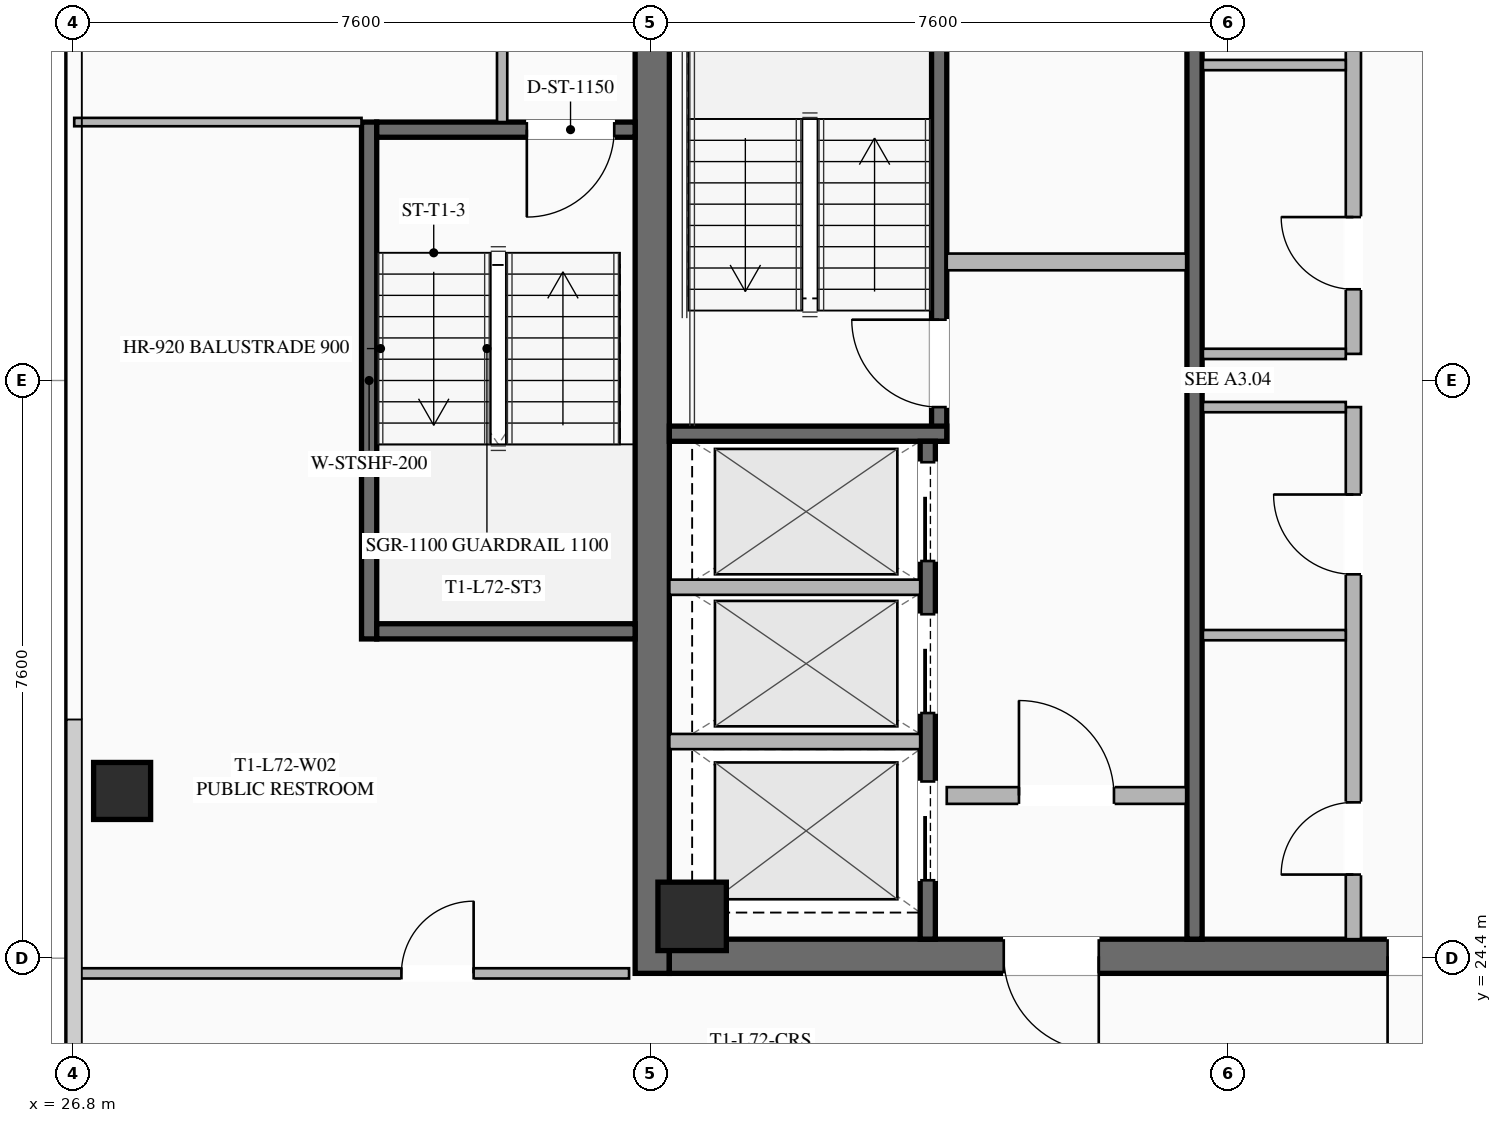
"""IFC4 building model, lengths in metres.
Left out: names, types, materials, properties, quantities, classifications, styles, units other than length and angle.
Written with IfcOpenShell. Run it as: python <this file> out.ifc"""

import sys

from ifc_helpers import new_model, si_unit, direction, frame, frame_2d, origin, origin_2d, place, context, subcontext, project, spatial, rectangle, hollow_rectangle, extrude, element, fill, save


model = new_model("IFC4")
c1 = context("Model", 3, precision=1e-05, world=origin(), true_north=direction((0.0, 1.0)))
c2 = subcontext(c1, "Body", "Model", "MODEL_VIEW")
j1 = project(units=[si_unit("LENGTHUNIT", "METRE"), si_unit("PLANEANGLEUNIT", "RADIAN")], contexts=[c1])
p1 = place(None, origin())
s1 = spatial("IfcSite", under=j1, at=p1, CompositionType="ELEMENT")
p2 = place(p1, origin())
s2 = spatial("IfcBuilding", under=s1, at=p2, CompositionType="ELEMENT")
p3 = place(p2, frame((0.0, 0.0, 266.95)))
s3 = spatial("IfcBuildingStorey", under=s2, at=p3, CompositionType="ELEMENT", Elevation=266.95)
p4 = place(p3, frame((34.425, 24.2, 0.0), z_axis=(0.0, 0.0, 1.0), x_axis=(0.0, 1.0, 0.0)))
e1 = element("IfcWall", 1, at=p4, inside=s3, PredefinedType="SHEAR", context=c2, shape_type="SweptSolid", body=[
    extrude(rectangle(XDim=15.6, YDim=0.45, at=frame_2d((7.8, 0.0))), origin(), (0.0, 0.0, 1.0), 3.55),
])
p5 = place(p3, frame((49.35, 24.425, 0.0), z_axis=(0.0, 0.0, 1.0), x_axis=(-1.0, 0.0, 0.0)))
e2 = element("IfcWall", 2, at=p5, inside=s3, PredefinedType="SHEAR", context=c2, shape_type="SweptSolid", body=[
    extrude(rectangle(XDim=14.7, YDim=0.45, at=frame_2d((7.35, 0.0))), origin(), (0.0, 0.0, 1.0), 3.55),
])
p6 = place(p5, frame((9.05, 0.0, 0.0)))
e3 = element("IfcOpeningElement", 3, at=p6, cuts=e2, PredefinedType="OPENING", context=c2, shape_type="SweptSolid", body=[
    extrude(rectangle(XDim=1.25, YDim=2.25, at=frame_2d((0.625, 1.125))), frame((0.0, 0.235, 0.0), z_axis=(0.0, -1.0, 0.0), x_axis=(1.0, 0.0, 0.0)), (0.0, 0.0, 1.0), 0.47),
])
p7 = place(p5, frame((4.0, 0.0, 0.0)))
e4 = element("IfcOpeningElement", 4, at=p7, cuts=e2, PredefinedType="OPENING", context=c2, shape_type="SweptSolid", body=[
    extrude(rectangle(XDim=1.25, YDim=2.25, at=frame_2d((0.625, 1.125))), frame((0.0, 0.235, 0.0), z_axis=(0.0, -1.0, 0.0), x_axis=(1.0, 0.0, 0.0)), (0.0, 0.0, 1.0), 0.47),
])
p8 = place(p3, frame((34.95, 24.95, 0.0), z_axis=(0.0, 0.0, 1.0), x_axis=(1.0, 0.0, 0.0)))
e5 = element("IfcColumn", 5, at=p8, inside=s3, PredefinedType="COLUMN", context=c2, shape_type="SweptSolid", body=[
    extrude(hollow_rectangle(XDim=0.9, YDim=0.9, WallThickness=0.04, at=origin_2d()), origin(), (0.0, 0.0, 1.0), 3.37),
])
p9 = place(p3, frame((27.45, 26.6, 0.0), z_axis=(0.0, 0.0, 1.0), x_axis=(1.0, 0.0, 0.0)))
e6 = element("IfcColumn", 6, at=p9, inside=s3, PredefinedType="COLUMN", context=c2, shape_type="SweptSolid", body=[
    extrude(hollow_rectangle(XDim=0.75, YDim=0.75, WallThickness=0.032, at=origin_2d()), origin(), (0.0, 0.0, 1.0), 3.37),
])
p10 = place(p3, frame((38.2, 31.2, 0.0), z_axis=(0.0, 0.0, 1.0), x_axis=(0.0, 1.0, 0.0)))
e7 = element("IfcWall", 7, at=p10, inside=s3, PredefinedType="SHEAR", context=c2, shape_type="SweptSolid", body=[
    extrude(rectangle(XDim=8.15, YDim=0.2, at=frame_2d((4.075, 0.0))), origin(), (0.0, 0.0, 1.0), 3.37),
])
p11 = place(p10, frame((0.45, 0.0, 0.0)))
e8 = element("IfcOpeningElement", 8, at=p11, cuts=e7, PredefinedType="OPENING", context=c2, shape_type="SweptSolid", body=[
    extrude(rectangle(XDim=1.15, YDim=2.2, at=frame_2d((0.575, 1.1))), frame((0.0, 0.11, 0.0), z_axis=(0.0, -1.0, 0.0), x_axis=(1.0, 0.0, 0.0)), (0.0, 0.0, 1.0), 0.22),
])
p12 = place(p3, frame((34.65, 31.3, 0.0), z_axis=(0.0, 0.0, 1.0), x_axis=(1.0, 0.0, 0.0)))
e9 = element("IfcWall", 9, at=p12, inside=s3, PredefinedType="SHEAR", context=c2, shape_type="SweptSolid", body=[
    extrude(rectangle(XDim=3.65, YDim=0.2, at=frame_2d((1.825, 0.0))), origin(), (0.0, 0.0, 1.0), 3.37),
])
p13 = place(p3, frame((41.56, 24.65, 0.0), z_axis=(0.0, 0.0, 1.0), x_axis=(0.0, 1.0, 0.0)))
e10 = element("IfcWall", 10, at=p13, inside=s3, PredefinedType="SHEAR", context=c2, shape_type="SweptSolid", body=[
    extrude(rectangle(XDim=14.7, YDim=0.2, at=frame_2d((7.35, 0.0))), origin(), (0.0, 0.0, 1.0), 3.37),
])
p14 = place(p3, frame((38.3, 33.56, 0.0), z_axis=(0.0, 0.0, 1.0), x_axis=(1.0, 0.0, 0.0)))
e11 = element("IfcWall", 11, at=p14, inside=s3, PredefinedType="SOLIDWALL", context=c2, shape_type="SweptSolid", body=[
    extrude(rectangle(XDim=3.15, YDim=0.22, at=frame_2d((1.575, 0.0))), origin(), (0.0, 0.0, 1.0), 2.723),
])
p15 = place(p3, frame((38.3, 26.54, 0.0), z_axis=(0.0, 0.0, 1.0), x_axis=(1.0, 0.0, 0.0)))
e12 = element("IfcWall", 12, at=p15, inside=s3, PredefinedType="SOLIDWALL", context=c2, shape_type="SweptSolid", body=[
    extrude(rectangle(XDim=3.15, YDim=0.22, at=frame_2d((1.575, 0.0))), origin(), (0.0, 0.0, 1.0), 2.723),
])
p16 = place(p15, frame((0.95, 0.0, 0.0)))
e13 = element("IfcOpeningElement", 13, at=p16, cuts=e12, PredefinedType="OPENING", context=c2, shape_type="SweptSolid", body=[
    extrude(rectangle(XDim=1.25, YDim=2.25, at=frame_2d((0.625, 1.125))), frame((0.0, 0.12, 0.0), z_axis=(0.0, -1.0, 0.0), x_axis=(1.0, 0.0, 0.0)), (0.0, 0.0, 1.0), 0.24),
])
p17 = place(p3, frame((38.05, 24.65, 0.0), z_axis=(0.0, 0.0, 1.0), x_axis=(0.0, 1.0, 0.0)))
e14 = element("IfcWall", 14, at=p17, inside=s3, PredefinedType="SHEAR", context=c2, shape_type="SweptSolid", body=[
    extrude(rectangle(XDim=6.55, YDim=0.2, at=frame_2d((3.275, 0.0))), origin(), (0.0, 0.0, 1.0), 3.37),
])
p18 = place(p17, frame((4.975, 0.0, 0.0)))
e15 = element("IfcOpeningElement", 15, at=p18, cuts=e14, PredefinedType="OPENING", context=c2, shape_type="SweptSolid", body=[
    extrude(rectangle(XDim=1.3, YDim=2.25, at=frame_2d((0.65, 1.125))), frame((0.0, 0.11, 0.0), z_axis=(0.0, -1.0, 0.0), x_axis=(1.0, 0.0, 0.0)), (0.0, 0.0, 1.0), 0.22),
])
p19 = place(p17, frame((2.975, 0.0, 0.0)))
e16 = element("IfcOpeningElement", 16, at=p19, cuts=e14, PredefinedType="OPENING", context=c2, shape_type="SweptSolid", body=[
    extrude(rectangle(XDim=1.3, YDim=2.25, at=frame_2d((0.65, 1.125))), frame((0.0, 0.11, 0.0), z_axis=(0.0, -1.0, 0.0), x_axis=(1.0, 0.0, 0.0)), (0.0, 0.0, 1.0), 0.22),
])
p20 = place(p17, frame((0.775, 0.0, 0.0)))
e17 = element("IfcOpeningElement", 17, at=p20, cuts=e14, PredefinedType="OPENING", context=c2, shape_type="SweptSolid", body=[
    extrude(rectangle(XDim=1.3, YDim=2.25, at=frame_2d((0.65, 1.125))), frame((0.0, 0.11, 0.0), z_axis=(0.0, -1.0, 0.0), x_axis=(1.0, 0.0, 0.0)), (0.0, 0.0, 1.0), 0.22),
])
for number, where, z_axis, x_axis in (
    (18, (34.65, 27.25, 0.0), (0.0, 0.0, 1.0), (1.0, 0.0, 0.0)),
    (19, (34.65, 29.28, 0.0), (0.0, 0.0, 1.0), (1.0, 0.0, 0.0)),
):
    element("IfcWall", number, at=place(p3, frame(where, z_axis=z_axis, x_axis=x_axis)), inside=s3, PredefinedType="SOLIDWALL", context=c2, shape_type="SweptSolid", body=[
        extrude(rectangle(XDim=3.3, YDim=0.2, at=frame_2d((1.65, 0.0))), origin(), (0.0, 0.0, 1.0), 3.37),
    ])
p21 = place(p3, frame((43.65, 24.65, 0.0), z_axis=(0.0, 0.0, 1.0), x_axis=(0.0, 1.0, 0.0)))
e20 = element("IfcWall", 20, at=p21, inside=s3, PredefinedType="SOLIDWALL", context=c2, shape_type="SweptSolid", body=[
    extrude(rectangle(XDim=7.0, YDim=0.2, at=frame_2d((3.5, 0.0))), origin(), (0.0, 0.0, 1.0), 2.723),
])
p22 = place(p21, frame((0.85, 0.0, 0.0)))
e21 = element("IfcOpeningElement", 21, at=p22, cuts=e20, PredefinedType="OPENING", context=c2, shape_type="SweptSolid", body=[
    extrude(rectangle(XDim=0.95, YDim=2.05, at=frame_2d((0.475, 1.025))), frame((0.0, 0.11, 0.0), z_axis=(0.0, -1.0, 0.0), x_axis=(1.0, 0.0, 0.0)), (0.0, 0.0, 1.0), 0.22),
])
p23 = place(p21, frame((4.8, 0.0, 0.0)))
e22 = element("IfcOpeningElement", 22, at=p23, cuts=e20, PredefinedType="OPENING", context=c2, shape_type="SweptSolid", body=[
    extrude(rectangle(XDim=1.05, YDim=2.2, at=frame_2d((0.525, 1.1))), frame((0.0, 0.11, 0.0), z_axis=(0.0, -1.0, 0.0), x_axis=(1.0, 0.0, 0.0)), (0.0, 0.0, 1.0), 0.22),
])
for number, where, z_axis, x_axis in (
    (23, (41.67, 31.65, 0.0), (0.0, 0.0, 1.0), (1.0, 0.0, 0.0)),
    (24, (41.67, 28.65, 0.0), (0.0, 0.0, 1.0), (1.0, 0.0, 0.0)),
):
    element("IfcWall", number, at=place(p3, frame(where, z_axis=z_axis, x_axis=x_axis)), inside=s3, PredefinedType="PARTITIONING", context=c2, shape_type="SweptSolid", body=[
        extrude(rectangle(XDim=1.88, YDim=0.135, at=frame_2d((0.94, 0.0))), origin(), (0.0, 0.0, 1.0), 2.723),
    ])
p24 = place(p3, frame((43.65, 32.35, 0.0), z_axis=(0.0, 0.0, 1.0), x_axis=(0.0, 1.0, 0.0)))
e25 = element("IfcWall", 25, at=p24, inside=s3, PredefinedType="SOLIDWALL", context=c2, shape_type="SweptSolid", body=[
    extrude(rectangle(XDim=7.0, YDim=0.2, at=frame_2d((3.5, 0.0))), origin(), (0.0, 0.0, 1.0), 2.723),
])
p25 = place(p24, frame((0.85, 0.0, 0.0)))
e26 = element("IfcOpeningElement", 26, at=p25, cuts=e25, PredefinedType="OPENING", context=c2, shape_type="SweptSolid", body=[
    extrude(rectangle(XDim=0.95, YDim=2.05, at=frame_2d((0.475, 1.025))), frame((0.0, 0.11, 0.0), z_axis=(0.0, -1.0, 0.0), x_axis=(1.0, 0.0, 0.0)), (0.0, 0.0, 1.0), 0.22),
])
p26 = place(p24, frame((4.85, 0.0, 0.0)))
e27 = element("IfcOpeningElement", 27, at=p26, cuts=e25, PredefinedType="OPENING", context=c2, shape_type="SweptSolid", body=[
    extrude(rectangle(XDim=0.95, YDim=2.05, at=frame_2d((0.475, 1.025))), frame((0.0, 0.11, 0.0), z_axis=(0.0, -1.0, 0.0), x_axis=(1.0, 0.0, 0.0)), (0.0, 0.0, 1.0), 0.22),
])
for number, where, z_axis, x_axis in (
    (28, (41.67, 32.35, 0.0), (0.0, 0.0, 1.0), (1.0, 0.0, 0.0)),
    (29, (41.67, 36.15, 0.0), (0.0, 0.0, 1.0), (1.0, 0.0, 0.0)),
):
    element("IfcWall", number, at=place(p3, frame(where, z_axis=z_axis, x_axis=x_axis)), inside=s3, PredefinedType="PARTITIONING", context=c2, shape_type="SweptSolid", body=[
        extrude(rectangle(XDim=1.88, YDim=0.135, at=frame_2d((0.94, 0.0))), origin(), (0.0, 0.0, 1.0), 2.723),
    ])
p27 = place(p3, frame((30.7, 28.6, 0.0), z_axis=(0.0, 0.0, 1.0), x_axis=(0.0, 1.0, 0.0)))
e30 = element("IfcWall", 30, at=p27, inside=s3, PredefinedType="SHEAR", context=c2, shape_type="SweptSolid", body=[
    extrude(rectangle(XDim=6.8, YDim=0.2, at=frame_2d((3.4, 0.0))), origin(), (0.0, 0.0, 1.0), 3.37),
])
p28 = place(p3, frame((34.2, 35.3, 0.0), z_axis=(0.0, 0.0, 1.0), x_axis=(-1.0, 0.0, 0.0)))
e31 = element("IfcWall", 31, at=p28, inside=s3, PredefinedType="SHEAR", context=c2, shape_type="SweptSolid", body=[
    extrude(rectangle(XDim=3.4, YDim=0.2, at=frame_2d((1.7, 0.0))), origin(), (0.0, 0.0, 1.0), 3.37),
])
p29 = place(p28, frame((0.275, 0.0, 0.0)))
e32 = element("IfcOpeningElement", 32, at=p29, cuts=e31, PredefinedType="OPENING", context=c2, shape_type="SweptSolid", body=[
    extrude(rectangle(XDim=1.15, YDim=2.2, at=frame_2d((0.575, 1.1))), frame((0.0, 0.11, 0.0), z_axis=(0.0, -1.0, 0.0), x_axis=(1.0, 0.0, 0.0)), (0.0, 0.0, 1.0), 0.22),
])
p30 = place(p3, frame((30.8, 28.7, 0.0), z_axis=(0.0, 0.0, 1.0), x_axis=(1.0, 0.0, 0.0)))
e33 = element("IfcWall", 33, at=p30, inside=s3, PredefinedType="SHEAR", context=c2, shape_type="SweptSolid", body=[
    extrude(rectangle(XDim=3.4, YDim=0.2, at=frame_2d((1.7, 0.0))), origin(), (0.0, 0.0, 1.0), 3.37),
])
p31 = place(p3, frame((32.45, 35.4, 0.0), z_axis=(0.0, 0.0, 1.0), x_axis=(0.0, 1.0, 0.0)))
e34 = element("IfcWall", 34, at=p31, inside=s3, PredefinedType="PARTITIONING", context=c2, shape_type="SweptSolid", body=[
    extrude(rectangle(XDim=4.4, YDim=0.135, at=frame_2d((2.2, 0.0))), origin(), (0.0, 0.0, 1.0), 2.723),
])
p32 = place(p3, frame((26.82, 24.2, 0.0), z_axis=(0.0, 0.0, 1.0), x_axis=(1.0, 0.0, 0.0)))
e35 = element("IfcWall", 35, at=p32, inside=s3, PredefinedType="PARTITIONING", context=c2, shape_type="SweptSolid", body=[
    extrude(rectangle(XDim=7.3, YDim=0.135, at=frame_2d((3.65, 0.0))), origin(), (0.0, 0.0, 1.0), 2.723),
])
p33 = place(p32, frame((4.305, 0.0, 0.0)))
e36 = element("IfcOpeningElement", 36, at=p33, cuts=e35, PredefinedType="OPENING", context=c2, shape_type="SweptSolid", body=[
    extrude(rectangle(XDim=0.95, YDim=2.05, at=frame_2d((0.475, 1.025))), frame((0.0, 0.077, 0.0), z_axis=(0.0, -1.0, 0.0), x_axis=(1.0, 0.0, 0.0)), (0.0, 0.0, 1.0), 0.155),
])
p34 = place(p3, frame((30.6, 35.4, 0.0), z_axis=(0.0, 0.0, 1.0), x_axis=(-1.0, 0.0, 0.0)))
e37 = element("IfcWall", 37, at=p34, inside=s3, PredefinedType="PARTITIONING", context=c2, shape_type="SweptSolid", body=[
    extrude(rectangle(XDim=3.78, YDim=0.11, at=frame_2d((1.89, 0.0))), origin(), (0.0, 0.0, 1.0), 2.723),
])
p35 = place(p6, origin())
e38 = element("IfcDoor", 38, at=p35, inside=s3, OperationType="SINGLE_SWING_LEFT", PredefinedType="DOOR", context=c2, shape_type="SweptSolid", body=[
    extrude(rectangle(XDim=1.25, YDim=2.25, at=frame_2d((0.625, 1.125))), frame((0.0, 0.025, 0.0), z_axis=(0.0, -1.0, 0.0), x_axis=(1.0, 0.0, 0.0)), (0.0, 0.0, 1.0), 0.05),
])
fill(e3, e38)
p36 = place(p7, origin())
e39 = element("IfcDoor", 39, at=p36, inside=s3, OperationType="SINGLE_SWING_RIGHT", PredefinedType="DOOR", context=c2, shape_type="SweptSolid", body=[
    extrude(rectangle(XDim=1.25, YDim=2.25, at=frame_2d((0.625, 1.125))), frame((0.0, 0.025, 0.0), z_axis=(0.0, -1.0, 0.0), x_axis=(1.0, 0.0, 0.0)), (0.0, 0.0, 1.0), 0.05),
])
fill(e4, e39)
p37 = place(p11, origin())
e40 = element("IfcDoor", 40, at=p37, inside=s3, OperationType="SINGLE_SWING_RIGHT", PredefinedType="DOOR", context=c2, shape_type="SweptSolid", body=[
    extrude(rectangle(XDim=1.15, YDim=2.2, at=frame_2d((0.575, 1.1))), frame((0.0, 0.025, 0.0), z_axis=(0.0, -1.0, 0.0), x_axis=(1.0, 0.0, 0.0)), (0.0, 0.0, 1.0), 0.05),
])
fill(e8, e40)
p38 = place(p16, origin())
e41 = element("IfcDoor", 41, at=p38, inside=s3, OperationType="SINGLE_SWING_LEFT", PredefinedType="DOOR", context=c2, shape_type="SweptSolid", body=[
    extrude(rectangle(XDim=1.25, YDim=2.25, at=frame_2d((0.625, 1.125))), frame((0.0, 0.025, 0.0), z_axis=(0.0, -1.0, 0.0), x_axis=(1.0, 0.0, 0.0)), (0.0, 0.0, 1.0), 0.05),
])
fill(e13, e41)
p39 = place(p22, origin())
e42 = element("IfcDoor", 42, at=p39, inside=s3, OperationType="SINGLE_SWING_LEFT", PredefinedType="DOOR", context=c2, shape_type="SweptSolid", body=[
    extrude(rectangle(XDim=0.95, YDim=2.05, at=frame_2d((0.475, 1.025))), frame((0.0, 0.025, 0.0), z_axis=(0.0, -1.0, 0.0), x_axis=(1.0, 0.0, 0.0)), (0.0, 0.0, 1.0), 0.05),
])
fill(e21, e42)
p40 = place(p23, origin())
e43 = element("IfcDoor", 43, at=p40, inside=s3, OperationType="SINGLE_SWING_RIGHT", PredefinedType="DOOR", context=c2, shape_type="SweptSolid", body=[
    extrude(rectangle(XDim=1.05, YDim=2.2, at=frame_2d((0.525, 1.1))), frame((0.0, 0.025, 0.0), z_axis=(0.0, -1.0, 0.0), x_axis=(1.0, 0.0, 0.0)), (0.0, 0.0, 1.0), 0.05),
])
fill(e22, e43)
p41 = place(p25, origin())
e44 = element("IfcDoor", 44, at=p41, inside=s3, OperationType="SINGLE_SWING_RIGHT", PredefinedType="DOOR", context=c2, shape_type="SweptSolid", body=[
    extrude(rectangle(XDim=0.95, YDim=2.05, at=frame_2d((0.475, 1.025))), frame((0.0, 0.025, 0.0), z_axis=(0.0, -1.0, 0.0), x_axis=(1.0, 0.0, 0.0)), (0.0, 0.0, 1.0), 0.05),
])
fill(e26, e44)
p42 = place(p29, origin())
e45 = element("IfcDoor", 45, at=p42, inside=s3, OperationType="SINGLE_SWING_RIGHT", PredefinedType="DOOR", context=c2, shape_type="SweptSolid", body=[
    extrude(rectangle(XDim=1.15, YDim=2.2, at=frame_2d((0.575, 1.1))), frame((0.0, 0.025, 0.0), z_axis=(0.0, -1.0, 0.0), x_axis=(1.0, 0.0, 0.0)), (0.0, 0.0, 1.0), 0.05),
])
fill(e32, e45)
p43 = place(p33, origin())
e46 = element("IfcDoor", 46, at=p43, inside=s3, OperationType="SINGLE_SWING_RIGHT", PredefinedType="DOOR", context=c2, shape_type="SweptSolid", body=[
    extrude(rectangle(XDim=0.95, YDim=2.05, at=frame_2d((0.475, 1.025))), frame((0.0, 0.025, 0.0), z_axis=(0.0, -1.0, 0.0), x_axis=(1.0, 0.0, 0.0)), (0.0, 0.0, 1.0), 0.05),
])
fill(e36, e46)
p44 = place(p18, origin())
e47 = element("IfcDoor", 47, at=p44, inside=s3, OperationType="SLIDING_TO_LEFT", PredefinedType="DOOR", context=c2, shape_type="SweptSolid", body=[
    extrude(rectangle(XDim=1.3, YDim=2.25, at=frame_2d((0.65, 1.125))), frame((0.0, 0.025, 0.0), z_axis=(0.0, -1.0, 0.0), x_axis=(1.0, 0.0, 0.0)), (0.0, 0.0, 1.0), 0.05),
])
fill(e15, e47)
p45 = place(p19, origin())
e48 = element("IfcDoor", 48, at=p45, inside=s3, OperationType="SLIDING_TO_LEFT", PredefinedType="DOOR", context=c2, shape_type="SweptSolid", body=[
    extrude(rectangle(XDim=1.3, YDim=2.25, at=frame_2d((0.65, 1.125))), frame((0.0, 0.025, 0.0), z_axis=(0.0, -1.0, 0.0), x_axis=(1.0, 0.0, 0.0)), (0.0, 0.0, 1.0), 0.05),
])
fill(e16, e48)
p46 = place(p20, origin())
e49 = element("IfcDoor", 49, at=p46, inside=s3, OperationType="SLIDING_TO_LEFT", PredefinedType="DOOR", context=c2, shape_type="SweptSolid", body=[
    extrude(rectangle(XDim=1.3, YDim=2.25, at=frame_2d((0.65, 1.125))), frame((0.0, 0.025, 0.0), z_axis=(0.0, -1.0, 0.0), x_axis=(1.0, 0.0, 0.0)), (0.0, 0.0, 1.0), 0.05),
])
fill(e17, e49)
save(model, sys.argv[1])
